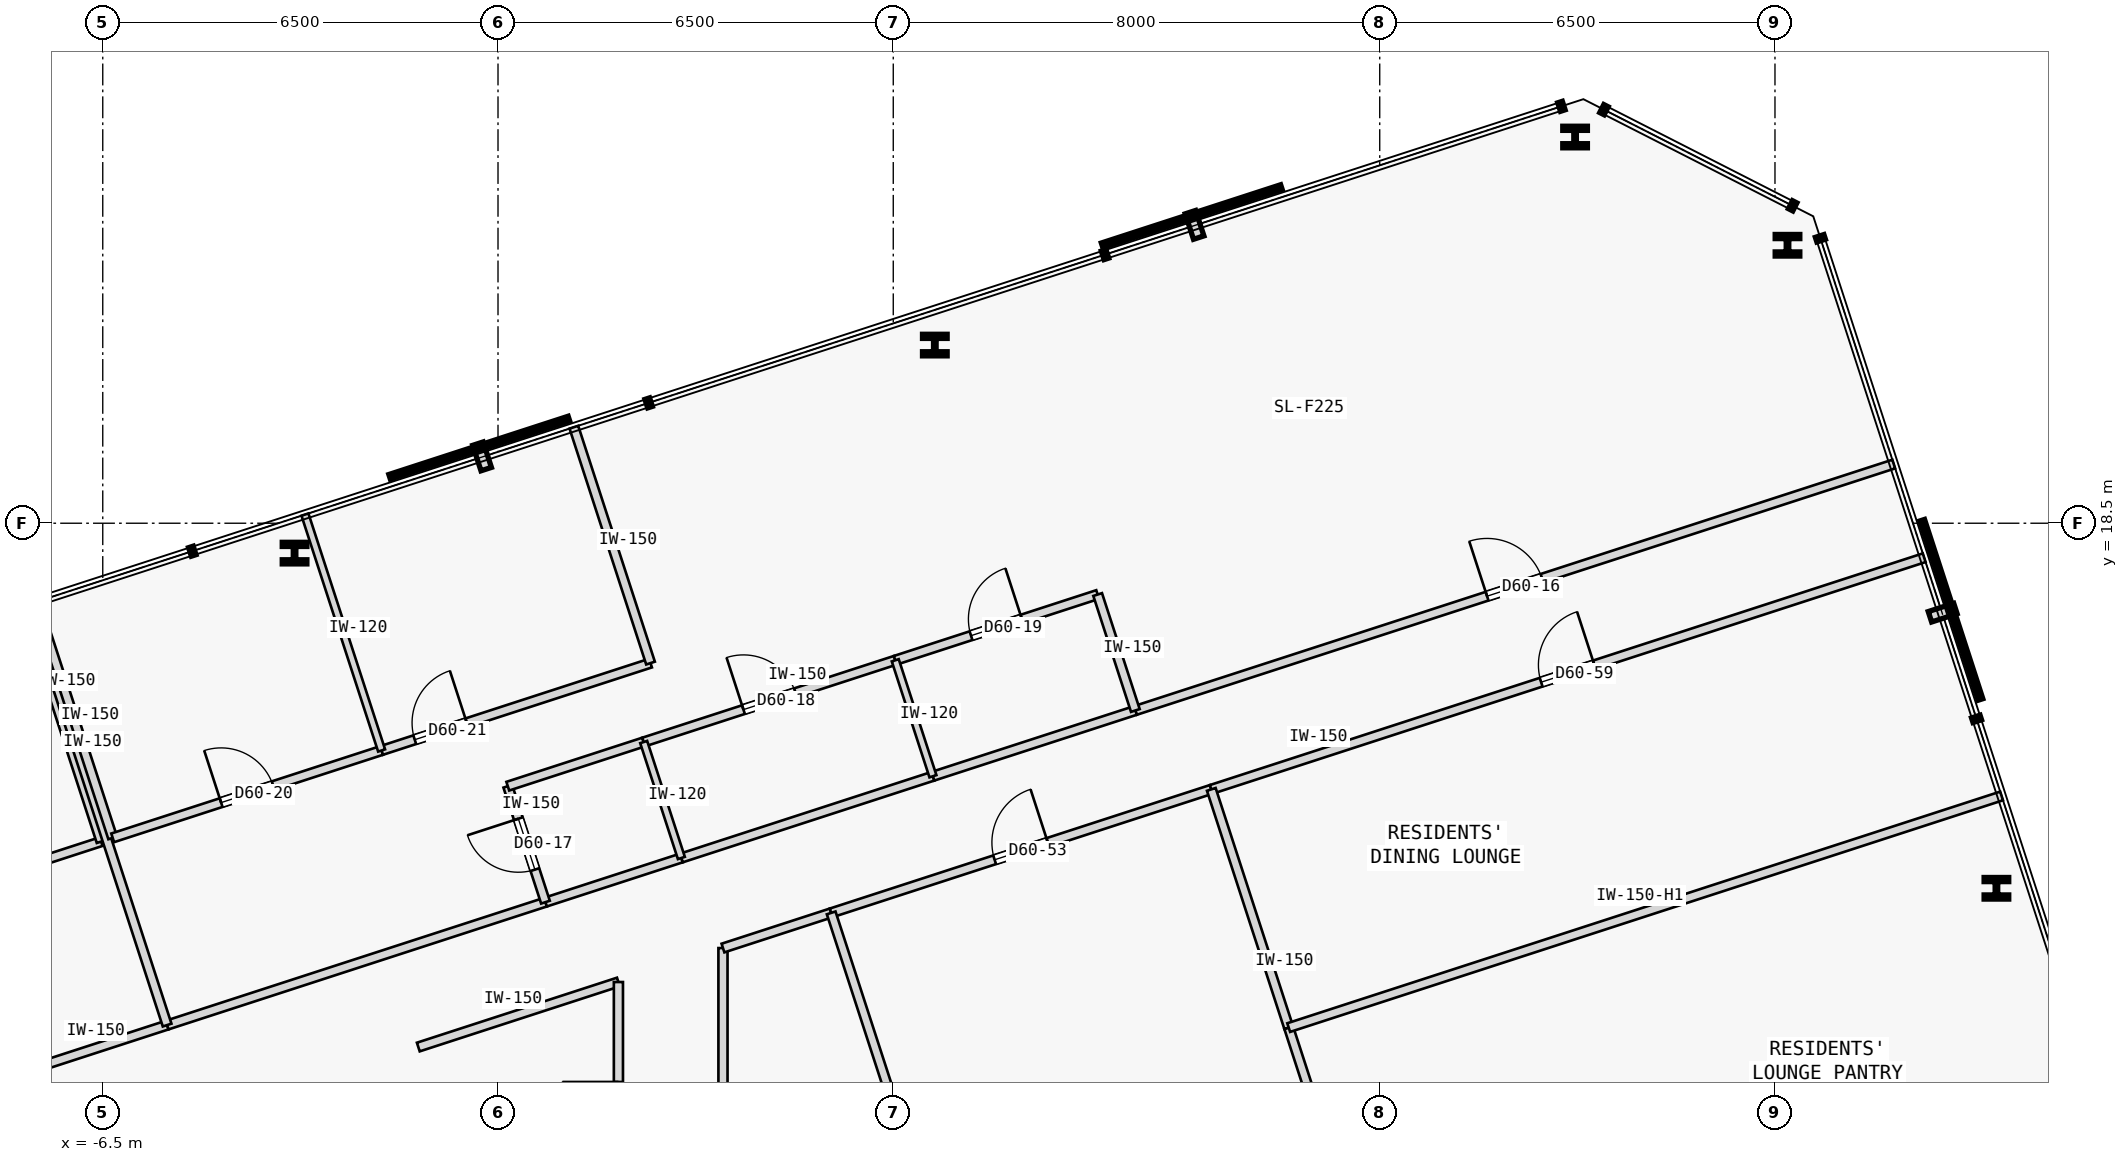
"""IFC4 building model, lengths in metres.
Left out: names, types, materials, properties, quantities, classifications, styles, units other than length and angle.
Written with IfcOpenShell. Run it as: python <this file> out.ifc"""

import sys

from ifc_helpers import new_model, si_unit, direction, frame, frame_2d, origin, origin_2d, place, context, subcontext, project, spatial, rectangle, i_section, extrude, element, fill, save


model = new_model("IFC4")
c1 = context("Model", 3, precision=1e-05, world=origin(), true_north=direction((0.0, 1.0)))
c2 = subcontext(c1, "Body", "Model", "MODEL_VIEW")
j1 = project(units=[si_unit("LENGTHUNIT", "METRE"), si_unit("PLANEANGLEUNIT", "RADIAN")], contexts=[c1])
p1 = place(None, origin())
s1 = spatial("IfcSite", under=j1, at=p1, CompositionType="ELEMENT")
p2 = place(p1, origin())
s2 = spatial("IfcBuilding", under=s1, at=p2, CompositionType="ELEMENT")
p3 = place(p2, frame((0.0, 0.0, 227.65)))
s3 = spatial("IfcBuildingStorey", under=s2, at=p3, CompositionType="ELEMENT", Elevation=227.65)
for number, where, z_axis, x_axis in (
    (1, (24.642, 12.497, 0.0), (0.0, 0.0, 1.0), (1.0, 0.0, 0.0)),
    (2, (21.206, 23.071, 0.0), (0.0, 0.0, 1.0), (1.0, 0.0, 0.0)),
    (3, (17.713, 24.851, 0.0), (0.0, 0.0, 1.0), (1.0, 0.0, 0.0)),
    (4, (7.184, 21.43, 0.0), (0.0, 0.0, 1.0), (1.0, 0.0, 0.0)),
    (5, (-3.346, 18.009, 0.0), (0.0, 0.0, 1.0), (1.0, 0.0, 0.0)),
):
    element("IfcColumn", number, at=place(p3, frame(where, z_axis=z_axis, x_axis=x_axis)), inside=s3, PredefinedType="COLUMN", context=c2, shape_type="SweptSolid", body=[
        extrude(i_section(OverallWidth=0.405, OverallDepth=0.355, WebThickness=0.042, FlangeThickness=0.068, FilletRadius=0.015, at=origin_2d()), origin(), (0.0, 0.0, 1.0), 3.35),
    ])
p4 = place(p3, frame((-19.497, 5.68, 0.0), z_axis=(0.0, 0.0, 1.0), x_axis=(0.95105300492, 0.309027801067, 0.0)))
e6 = element("IfcWall", 6, at=p4, inside=s3, PredefinedType="PARTITIONING", context=c2, shape_type="SweptSolid", body=[
    extrude(rectangle(XDim=14.779, YDim=0.15, at=frame_2d((7.39, 0.0))), origin(), (0.0, 0.0, 1.0), 3.125),
])
p5 = place(p4, frame((6.915, 0.0, 0.0)))
e7 = element("IfcOpeningElement", 7, at=p5, cuts=e6, PredefinedType="OPENING", context=c2, shape_type="SweptSolid", body=[
    extrude(rectangle(XDim=0.95, YDim=2.15, at=frame_2d((0.475, 1.075))), frame((0.0, 0.085, 0.0), z_axis=(0.0, -1.0, 0.0), x_axis=(1.0, 0.0, 0.0)), (0.0, 0.0, 1.0), 0.17),
])
p6 = place(p3, frame((-5.441, 10.247, 0.0), z_axis=(0.0, 0.0, 1.0), x_axis=(0.951062860421, 0.308997468483, 0.0)))
e8 = element("IfcWall", 8, at=p6, inside=s3, PredefinedType="PARTITIONING", context=c2, shape_type="SweptSolid", body=[
    extrude(rectangle(XDim=6.542, YDim=0.15, at=frame_2d((3.271, 0.0))), origin(), (0.0, 0.0, 1.0), 3.125),
])
p7 = place(p3, frame((10.481, 15.421, 0.0), z_axis=(0.0, 0.0, 1.0), x_axis=(0.951055682471, 0.30901956061, 0.0)))
e9 = element("IfcWall", 9, at=p7, inside=s3, PredefinedType="PARTITIONING", context=c2, shape_type="SweptSolid", body=[
    extrude(rectangle(XDim=13.114, YDim=0.15, at=frame_2d((6.557, 0.0))), origin(), (0.0, 0.0, 1.0), 3.125),
])
p8 = place(p7, frame((6.082, 0.0, 0.0)))
e10 = element("IfcOpeningElement", 10, at=p8, cuts=e9, PredefinedType="OPENING", context=c2, shape_type="SweptSolid", body=[
    extrude(rectangle(XDim=0.95, YDim=2.15, at=frame_2d((0.475, 1.075))), frame((0.0, 0.085, 0.0), z_axis=(0.0, -1.0, 0.0), x_axis=(1.0, 0.0, 0.0)), (0.0, 0.0, 1.0), 0.17),
])
p9 = place(p3, frame((0.781, 12.269, 0.0), z_axis=(0.0, 0.0, 1.0), x_axis=(0.951066131077, 0.308987401554, 0.0)))
e11 = element("IfcWall", 11, at=p9, inside=s3, PredefinedType="PARTITIONING", context=c2, shape_type="SweptSolid", body=[
    extrude(rectangle(XDim=2.35, YDim=0.15, at=frame_2d((1.175, 0.0))), origin(), (0.0, 0.0, 1.0), 3.125),
])
p10 = place(p3, frame((3.015, 12.995, 0.0), z_axis=(0.0, 0.0, 1.0), x_axis=(0.951052627573, 0.309028962374, 0.0)))
e12 = element("IfcWall", 12, at=p10, inside=s3, PredefinedType="PARTITIONING", context=c2, shape_type="SweptSolid", body=[
    extrude(rectangle(XDim=4.35, YDim=0.15, at=frame_2d((2.175, 0.0))), origin(), (0.0, 0.0, 1.0), 3.125),
])
p11 = place(p3, frame((7.152, 14.339, 0.0), z_axis=(0.0, 0.0, 1.0), x_axis=(0.951062257173, 0.308999325213, 0.0)))
e13 = element("IfcWall", 13, at=p11, inside=s3, PredefinedType="PARTITIONING", context=c2, shape_type="SweptSolid", body=[
    extrude(rectangle(XDim=3.5, YDim=0.15, at=frame_2d((1.75, 0.0))), origin(), (0.0, 0.0, 1.0), 3.125),
])
p12 = place(p3, frame((3.7, 5.6, 0.0), z_axis=(0.0, 0.0, 1.0), x_axis=(-0.000123839008, 0.999999992332, 0.0)))
e14 = element("IfcWall", 14, at=p12, inside=s3, PredefinedType="PARTITIONING", context=c2, shape_type="SweptSolid", body=[
    extrude(rectangle(XDim=5.914, YDim=0.15, at=frame_2d((2.957, 0.0))), origin(), (0.0, 0.0, 1.0), 2.675),
])
p13 = place(p12, frame((2.497, 0.0, 0.0)))
e15 = element("IfcOpeningElement", 15, at=p13, cuts=e14, PredefinedType="OPENING", context=c2, shape_type="SweptSolid", body=[
    extrude(rectangle(XDim=0.92, YDim=2.15, at=frame_2d((0.46, 1.075))), frame((0.0, 0.085, 0.0), z_axis=(0.0, -1.0, 0.0), x_axis=(1.0, 0.0, 0.0)), (0.0, 0.0, 1.0), 0.17),
])
p14 = place(p3, frame((3.699, 11.514, 0.0), z_axis=(0.0, 0.0, 1.0), x_axis=(0.951069540665, 0.308976906612, 0.0)))
e16 = element("IfcWall", 16, at=p14, inside=s3, PredefinedType="PARTITIONING", context=c2, shape_type="SweptSolid", body=[
    extrude(rectangle(XDim=1.871, YDim=0.15, at=frame_2d((0.936, 0.0))), origin(), (0.0, 0.0, 1.0), 3.125),
])
p15 = place(p3, frame((5.479, 12.092, 0.0), z_axis=(0.0, 0.0, 1.0), x_axis=(0.951051809397, 0.309031480343, 0.0)))
e17 = element("IfcWall", 17, at=p15, inside=s3, PredefinedType="PARTITIONING", context=c2, shape_type="SweptSolid", body=[
    extrude(rectangle(XDim=6.573, YDim=0.15, at=frame_2d((3.287, 0.0))), origin(), (0.0, 0.0, 1.0), 3.125),
])
p16 = place(p15, frame((2.826, 0.0, 0.0)))
e18 = element("IfcOpeningElement", 18, at=p16, cuts=e17, PredefinedType="OPENING", context=c2, shape_type="SweptSolid", body=[
    extrude(rectangle(XDim=0.92, YDim=2.15, at=frame_2d((0.46, 1.075))), frame((0.0, 0.085, 0.0), z_axis=(0.0, -1.0, 0.0), x_axis=(1.0, 0.0, 0.0)), (0.0, 0.0, 1.0), 0.17),
])
p17 = place(p3, frame((-1.311, 9.886, 0.0), z_axis=(0.0, 0.0, 1.0), x_axis=(0.951068803905, 0.308979174442, 0.0)))
e19 = element("IfcWall", 19, at=p17, inside=s3, PredefinedType="PARTITIONING", context=c2, shape_type="SweptSolid", body=[
    extrude(rectangle(XDim=3.46, YDim=0.15, at=frame_2d((1.73, 0.0))), origin(), (0.0, 0.0, 1.0), 3.125),
])
p18 = place(p3, frame((1.98, 6.748, 0.0), z_axis=(0.0, 0.0, 1.0), x_axis=(0.0, 1.0, 0.0)))
e20 = element("IfcWall", 20, at=p18, inside=s3, PredefinedType="PARTITIONING", context=c2, shape_type="SweptSolid", body=[
    extrude(rectangle(XDim=4.207, YDim=0.15, at=frame_2d((2.104, 0.0))), origin(), (0.0, 0.0, 1.0), 2.675),
])
p19 = place(p18, frame((1.643, 0.0, 0.0)))
e21 = element("IfcOpeningElement", 21, at=p19, cuts=e20, PredefinedType="OPENING", context=c2, shape_type="SweptSolid", body=[
    extrude(rectangle(XDim=0.92, YDim=2.15, at=frame_2d((0.46, 1.075))), frame((0.0, 0.085, 0.0), z_axis=(0.0, -1.0, 0.0), x_axis=(1.0, 0.0, 0.0)), (0.0, 0.0, 1.0), 0.17),
])
p20 = place(p3, frame((11.73, 14.123, 0.0), z_axis=(0.0, 0.0, 1.0), x_axis=(0.951060263663, 0.309005460926, 0.0)))
e22 = element("IfcWall", 22, at=p20, inside=s3, PredefinedType="PARTITIONING", context=c2, shape_type="SweptSolid", body=[
    extrude(rectangle(XDim=12.327, YDim=0.15, at=frame_2d((6.164, 0.0))), origin(), (0.0, 0.0, 1.0), 3.125),
])
p21 = place(p20, frame((5.704, 0.0, 0.0)))
e23 = element("IfcOpeningElement", 23, at=p21, cuts=e22, PredefinedType="OPENING", context=c2, shape_type="SweptSolid", body=[
    extrude(rectangle(XDim=0.92, YDim=2.15, at=frame_2d((0.46, 1.075))), frame((0.0, 0.085, 0.0), z_axis=(0.0, -1.0, 0.0), x_axis=(1.0, 0.0, 0.0)), (0.0, 0.0, 1.0), 0.17),
])
p22 = place(p3, frame((-10.949, 11.827, 0.0), z_axis=(0.0, 0.0, 1.0), x_axis=(0.951050272606, 0.309036209813, 0.0)))
e24 = element("IfcWall", 24, at=p22, inside=s3, PredefinedType="PARTITIONING", context=c2, shape_type="SweptSolid", body=[
    extrude(rectangle(XDim=4.65, YDim=0.15, at=frame_2d((2.325, 0.0))), origin(), (0.0, 0.0, 1.0), 3.125),
])
p23 = place(p22, frame((1.875, 0.0, 0.0)))
e25 = element("IfcOpeningElement", 25, at=p23, cuts=e24, PredefinedType="OPENING", context=c2, shape_type="SweptSolid", body=[
    extrude(rectangle(XDim=0.9, YDim=2.15, at=frame_2d((0.45, 1.075))), frame((0.0, 0.085, 0.0), z_axis=(0.0, -1.0, 0.0), x_axis=(1.0, 0.0, 0.0)), (0.0, 0.0, 1.0), 0.17),
])
p24 = place(p3, frame((-6.527, 13.264, 0.0), z_axis=(0.0, 0.0, 1.0), x_axis=(-0.308964264858, 0.951073647538, 0.0)))
e26 = element("IfcWall", 26, at=p24, inside=s3, PredefinedType="PARTITIONING", context=c2, shape_type="SweptSolid", body=[
    extrude(rectangle(XDim=4.079, YDim=0.15, at=frame_2d((2.04, 0.0))), origin(), (0.0, 0.0, 1.0), 3.125),
])
p25 = place(p3, frame((-5.441, 10.247, 0.0), z_axis=(0.0, 0.0, 1.0), x_axis=(-0.309039081864, 0.951049339351, 0.0)))
e27 = element("IfcWall", 27, at=p25, inside=s3, PredefinedType="PARTITIONING", context=c2, shape_type="SweptSolid", body=[
    extrude(rectangle(XDim=7.284, YDim=0.15, at=frame_2d((3.642, 0.0))), origin(), (0.0, 0.0, 1.0), 3.125),
])
p26 = place(p3, frame((0.781, 12.269, 0.0), z_axis=(0.0, 0.0, 1.0), x_axis=(-0.309058537449, 0.951043017129, 0.0)))
e28 = element("IfcWall", 28, at=p26, inside=s3, PredefinedType="PARTITIONING", context=c2, shape_type="SweptSolid", body=[
    extrude(rectangle(XDim=2.005, YDim=0.15, at=frame_2d((1.002, 0.0))), origin(), (0.0, 0.0, 1.0), 3.125),
])
p27 = place(p26, frame((0.562, 0.0, 0.0)))
e29 = element("IfcOpeningElement", 29, at=p27, cuts=e28, PredefinedType="OPENING", context=c2, shape_type="SweptSolid", body=[
    extrude(rectangle(XDim=0.88, YDim=2.15, at=frame_2d((0.44, 1.075))), frame((0.0, 0.085, 0.0), z_axis=(0.0, -1.0, 0.0), x_axis=(1.0, 0.0, 0.0)), (0.0, 0.0, 1.0), 0.17),
])
p28 = place(p3, frame((0.161, 14.176, 0.0), z_axis=(0.0, 0.0, 1.0), x_axis=(0.951035595692, 0.309081373955, 0.0)))
e30 = element("IfcWall", 30, at=p28, inside=s3, PredefinedType="PARTITIONING", context=c2, shape_type="SweptSolid", body=[
    extrude(rectangle(XDim=2.35, YDim=0.15, at=frame_2d((1.175, 0.0))), origin(), (0.0, 0.0, 1.0), 3.125),
])
p29 = place(p3, frame((2.396, 14.902, 0.0), z_axis=(0.0, 0.0, 1.0), x_axis=(0.951057987102, 0.309012467661, 0.0)))
e31 = element("IfcWall", 31, at=p29, inside=s3, PredefinedType="PARTITIONING", context=c2, shape_type="SweptSolid", body=[
    extrude(rectangle(XDim=4.35, YDim=0.15, at=frame_2d((2.175, 0.0))), origin(), (0.0, 0.0, 1.0), 3.125),
])
p30 = place(p29, frame((1.725, 0.0, 0.0)))
e32 = element("IfcOpeningElement", 32, at=p30, cuts=e31, PredefinedType="OPENING", context=c2, shape_type="SweptSolid", body=[
    extrude(rectangle(XDim=0.9, YDim=2.15, at=frame_2d((0.45, 1.075))), frame((0.0, 0.085, 0.0), z_axis=(0.0, -1.0, 0.0), x_axis=(1.0, 0.0, 0.0)), (0.0, 0.0, 1.0), 0.17),
])
p31 = place(p3, frame((6.533, 16.246, 0.0), z_axis=(0.0, 0.0, 1.0), x_axis=(0.951055596592, 0.309019824916, 0.0)))
e33 = element("IfcWall", 33, at=p31, inside=s3, PredefinedType="PARTITIONING", context=c2, shape_type="SweptSolid", body=[
    extrude(rectangle(XDim=3.5, YDim=0.15, at=frame_2d((1.75, 0.0))), origin(), (0.0, 0.0, 1.0), 3.125),
])
p32 = place(p31, frame((1.31, 0.0, 0.0)))
e34 = element("IfcOpeningElement", 34, at=p32, cuts=e33, PredefinedType="OPENING", context=c2, shape_type="SweptSolid", body=[
    extrude(rectangle(XDim=0.88, YDim=2.15, at=frame_2d((0.44, 1.075))), frame((0.0, 0.085, 0.0), z_axis=(0.0, -1.0, 0.0), x_axis=(1.0, 0.0, 0.0)), (0.0, 0.0, 1.0), 0.17),
])
p33 = place(p3, frame((10.481, 15.421, 0.0), z_axis=(0.0, 0.0, 1.0), x_axis=(-0.309022749039, 0.951054646472, 0.0)))
e35 = element("IfcWall", 35, at=p33, inside=s3, PredefinedType="PARTITIONING", context=c2, shape_type="SweptSolid", body=[
    extrude(rectangle(XDim=2.005, YDim=0.15, at=frame_2d((1.002, 0.0))), origin(), (0.0, 0.0, 1.0), 3.125),
])
p34 = place(p3, frame((-6.337, 13.326, 0.0), z_axis=(0.0, 0.0, 1.0), x_axis=(-0.309018403393, 0.951056058476, 0.0)))
e36 = element("IfcWall", 36, at=p34, inside=s3, PredefinedType="PARTITIONING", context=c2, shape_type="SweptSolid", body=[
    extrude(rectangle(XDim=4.079, YDim=0.15, at=frame_2d((2.04, 0.0))), origin(), (0.0, 0.0, 1.0), 3.125),
])
p35 = place(p3, frame((-6.337, 13.326, 0.0), z_axis=(0.0, 0.0, 1.0), x_axis=(0.951050272606, 0.309036209813, 0.0)))
e37 = element("IfcWall", 37, at=p35, inside=s3, PredefinedType="PARTITIONING", context=c2, shape_type="SweptSolid", body=[
    extrude(rectangle(XDim=4.65, YDim=0.15, at=frame_2d((2.325, 0.0))), origin(), (0.0, 0.0, 1.0), 3.125),
])
p36 = place(p35, frame((1.875, 0.0, 0.0)))
e38 = element("IfcOpeningElement", 38, at=p36, cuts=e37, PredefinedType="OPENING", context=c2, shape_type="SweptSolid", body=[
    extrude(rectangle(XDim=0.9, YDim=2.15, at=frame_2d((0.45, 1.075))), frame((0.0, 0.085, 0.0), z_axis=(0.0, -1.0, 0.0), x_axis=(1.0, 0.0, 0.0)), (0.0, 0.0, 1.0), 0.17),
])
p37 = place(p3, frame((-1.914, 14.763, 0.0), z_axis=(0.0, 0.0, 1.0), x_axis=(0.951065702951, 0.308988719326, 0.0)))
e39 = element("IfcWall", 39, at=p37, inside=s3, PredefinedType="PARTITIONING", context=c2, shape_type="SweptSolid", body=[
    extrude(rectangle(XDim=4.65, YDim=0.15, at=frame_2d((2.325, 0.0))), origin(), (0.0, 0.0, 1.0), 3.125),
])
p38 = place(p37, frame((0.573, 0.0, 0.0)))
e40 = element("IfcOpeningElement", 40, at=p38, cuts=e39, PredefinedType="OPENING", context=c2, shape_type="SweptSolid", body=[
    extrude(rectangle(XDim=0.9, YDim=2.15, at=frame_2d((0.45, 1.075))), frame((0.0, 0.085, 0.0), z_axis=(0.0, -1.0, 0.0), x_axis=(1.0, 0.0, 0.0)), (0.0, 0.0, 1.0), 0.17),
])
p39 = place(p3, frame((2.508, 16.2, 0.0), z_axis=(0.0, 0.0, 1.0), x_axis=(-0.309018403393, 0.951056058476, 0.0)))
e41 = element("IfcWall", 41, at=p39, inside=s3, PredefinedType="PARTITIONING", context=c2, shape_type="SweptSolid", body=[
    extrude(rectangle(XDim=4.079, YDim=0.15, at=frame_2d((2.04, 0.0))), origin(), (0.0, 0.0, 1.0), 3.125),
])
for number, where, z_axis, x_axis in (
    (42, (3.015, 12.995, 0.0), (0.0, 0.0, 1.0), (-0.309, 0.951, 0.0)),
    (43, (7.152, 14.339, 0.0), (0.0, 0.0, 1.0), (-0.309, 0.951, 0.0)),
):
    element("IfcWall", number, at=place(p3, frame(where, z_axis=z_axis, x_axis=x_axis)), inside=s3, PredefinedType="PARTITIONING", context=c2, shape_type="SweptSolid", body=[
        extrude(rectangle(XDim=2.005, YDim=0.12, at=frame_2d((1.002, 0.0))), origin(), (0.0, 0.0, 1.0), 3.125),
    ])
p40 = place(p3, frame((-1.914, 14.763, 0.0), z_axis=(0.0, 0.0, 1.0), x_axis=(-0.309018403393, 0.951056058476, 0.0)))
e44 = element("IfcWall", 44, at=p40, inside=s3, PredefinedType="PARTITIONING", context=c2, shape_type="SweptSolid", body=[
    extrude(rectangle(XDim=4.079, YDim=0.12, at=frame_2d((2.04, 0.0))), origin(), (0.0, 0.0, 1.0), 3.125),
])
p41 = place(p3, frame((7.588, 5.6, 0.0), z_axis=(0.0, 0.0, 1.0), x_axis=(-0.309018946982, 0.951055881852, 0.0)))
e45 = element("IfcWall", 45, at=p41, inside=s3, PredefinedType="PARTITIONING", context=c2, shape_type="SweptSolid", body=[
    extrude(rectangle(XDim=6.826, YDim=0.15, at=frame_2d((3.413, 0.0))), origin(), (0.0, 0.0, 1.0), 3.125),
])
p42 = place(p3, frame((14.5, 5.6, 0.0), z_axis=(0.0, 0.0, 1.0), x_axis=(-0.308974360462, 0.951070367837, 0.0)))
e46 = element("IfcWall", 46, at=p42, inside=s3, PredefinedType="PARTITIONING", context=c2, shape_type="SweptSolid", body=[
    extrude(rectangle(XDim=4.843, YDim=0.15, at=frame_2d((2.421, 0.0))), origin(), (0.0, 0.0, 1.0), 3.125),
])
p43 = place(p3, frame((13.003, 10.206, 0.0), z_axis=(0.0, 0.0, 1.0), x_axis=(-0.309035144366, 0.951050618814, 0.0)))
e47 = element("IfcWall", 47, at=p43, inside=s3, PredefinedType="PARTITIONING", context=c2, shape_type="SweptSolid", body=[
    extrude(rectangle(XDim=4.119, YDim=0.15, at=frame_2d((2.06, 0.0))), origin(), (0.0, 0.0, 1.0), 3.125),
])
p44 = place(p3, frame((13.003, 10.206, 0.0), z_axis=(0.0, 0.0, 1.0), x_axis=(0.951060263663, 0.309005460926, 0.0)))
e48 = element("IfcWall", 48, at=p44, inside=s3, PredefinedType="PARTITIONING", context=c2, shape_type="SweptSolid", body=[
    extrude(rectangle(XDim=12.327, YDim=0.15, at=frame_2d((6.164, 0.0))), origin(), (0.0, 0.0, 1.0), 2.675),
])
p45 = place(p8, origin())
e49 = element("IfcDoor", 49, at=p45, inside=s3, OperationType="SINGLE_SWING_LEFT", PredefinedType="DOOR", context=c2, shape_type="SweptSolid", body=[
    extrude(rectangle(XDim=0.95, YDim=2.15, at=frame_2d((0.475, 1.075))), frame((0.0, 0.025, 0.0), z_axis=(0.0, -1.0, 0.0), x_axis=(1.0, 0.0, 0.0)), (0.0, 0.0, 1.0), 0.05),
])
fill(e10, e49)
p46 = place(p27, origin())
e50 = element("IfcDoor", 50, at=p46, inside=s3, OperationType="SINGLE_SWING_RIGHT", PredefinedType="DOOR", context=c2, shape_type="SweptSolid", body=[
    extrude(rectangle(XDim=0.88, YDim=2.15, at=frame_2d((0.44, 1.075))), frame((0.0, 0.025, 0.0), z_axis=(0.0, -1.0, 0.0), x_axis=(1.0, 0.0, 0.0)), (0.0, 0.0, 1.0), 0.05),
])
fill(e29, e50)
p47 = place(p30, origin())
e51 = element("IfcDoor", 51, at=p47, inside=s3, OperationType="SINGLE_SWING_LEFT", PredefinedType="DOOR", context=c2, shape_type="SweptSolid", body=[
    extrude(rectangle(XDim=0.9, YDim=2.15, at=frame_2d((0.45, 1.075))), frame((0.0, 0.025, 0.0), z_axis=(0.0, -1.0, 0.0), x_axis=(1.0, 0.0, 0.0)), (0.0, 0.0, 1.0), 0.05),
])
fill(e32, e51)
p48 = place(p32, origin())
e52 = element("IfcDoor", 52, at=p48, inside=s3, OperationType="SINGLE_SWING_RIGHT", PredefinedType="DOOR", context=c2, shape_type="SweptSolid", body=[
    extrude(rectangle(XDim=0.88, YDim=2.15, at=frame_2d((0.44, 1.075))), frame((0.0, 0.025, 0.0), z_axis=(0.0, -1.0, 0.0), x_axis=(1.0, 0.0, 0.0)), (0.0, 0.0, 1.0), 0.05),
])
fill(e34, e52)
p49 = place(p36, origin())
e53 = element("IfcDoor", 53, at=p49, inside=s3, OperationType="SINGLE_SWING_LEFT", PredefinedType="DOOR", context=c2, shape_type="SweptSolid", body=[
    extrude(rectangle(XDim=0.9, YDim=2.15, at=frame_2d((0.45, 1.075))), frame((0.0, 0.025, 0.0), z_axis=(0.0, -1.0, 0.0), x_axis=(1.0, 0.0, 0.0)), (0.0, 0.0, 1.0), 0.05),
])
fill(e38, e53)
p50 = place(p38, origin())
e54 = element("IfcDoor", 54, at=p50, inside=s3, OperationType="SINGLE_SWING_RIGHT", PredefinedType="DOOR", context=c2, shape_type="SweptSolid", body=[
    extrude(rectangle(XDim=0.9, YDim=2.15, at=frame_2d((0.45, 1.075))), frame((0.0, 0.025, 0.0), z_axis=(0.0, -1.0, 0.0), x_axis=(1.0, 0.0, 0.0)), (0.0, 0.0, 1.0), 0.05),
])
fill(e40, e54)
p51 = place(p16, origin())
e55 = element("IfcDoor", 55, at=p51, inside=s3, OperationType="SINGLE_SWING_RIGHT", PredefinedType="DOOR", context=c2, shape_type="SweptSolid", body=[
    extrude(rectangle(XDim=0.92, YDim=2.15, at=frame_2d((0.46, 1.075))), frame((0.0, 0.025, 0.0), z_axis=(0.0, -1.0, 0.0), x_axis=(1.0, 0.0, 0.0)), (0.0, 0.0, 1.0), 0.05),
])
fill(e18, e55)
p52 = place(p21, origin())
e56 = element("IfcDoor", 56, at=p52, inside=s3, OperationType="SINGLE_SWING_RIGHT", PredefinedType="DOOR", context=c2, shape_type="SweptSolid", body=[
    extrude(rectangle(XDim=0.92, YDim=2.15, at=frame_2d((0.46, 1.075))), frame((0.0, 0.025, 0.0), z_axis=(0.0, -1.0, 0.0), x_axis=(1.0, 0.0, 0.0)), (0.0, 0.0, 1.0), 0.05),
])
fill(e23, e56)
save(model, sys.argv[1])
